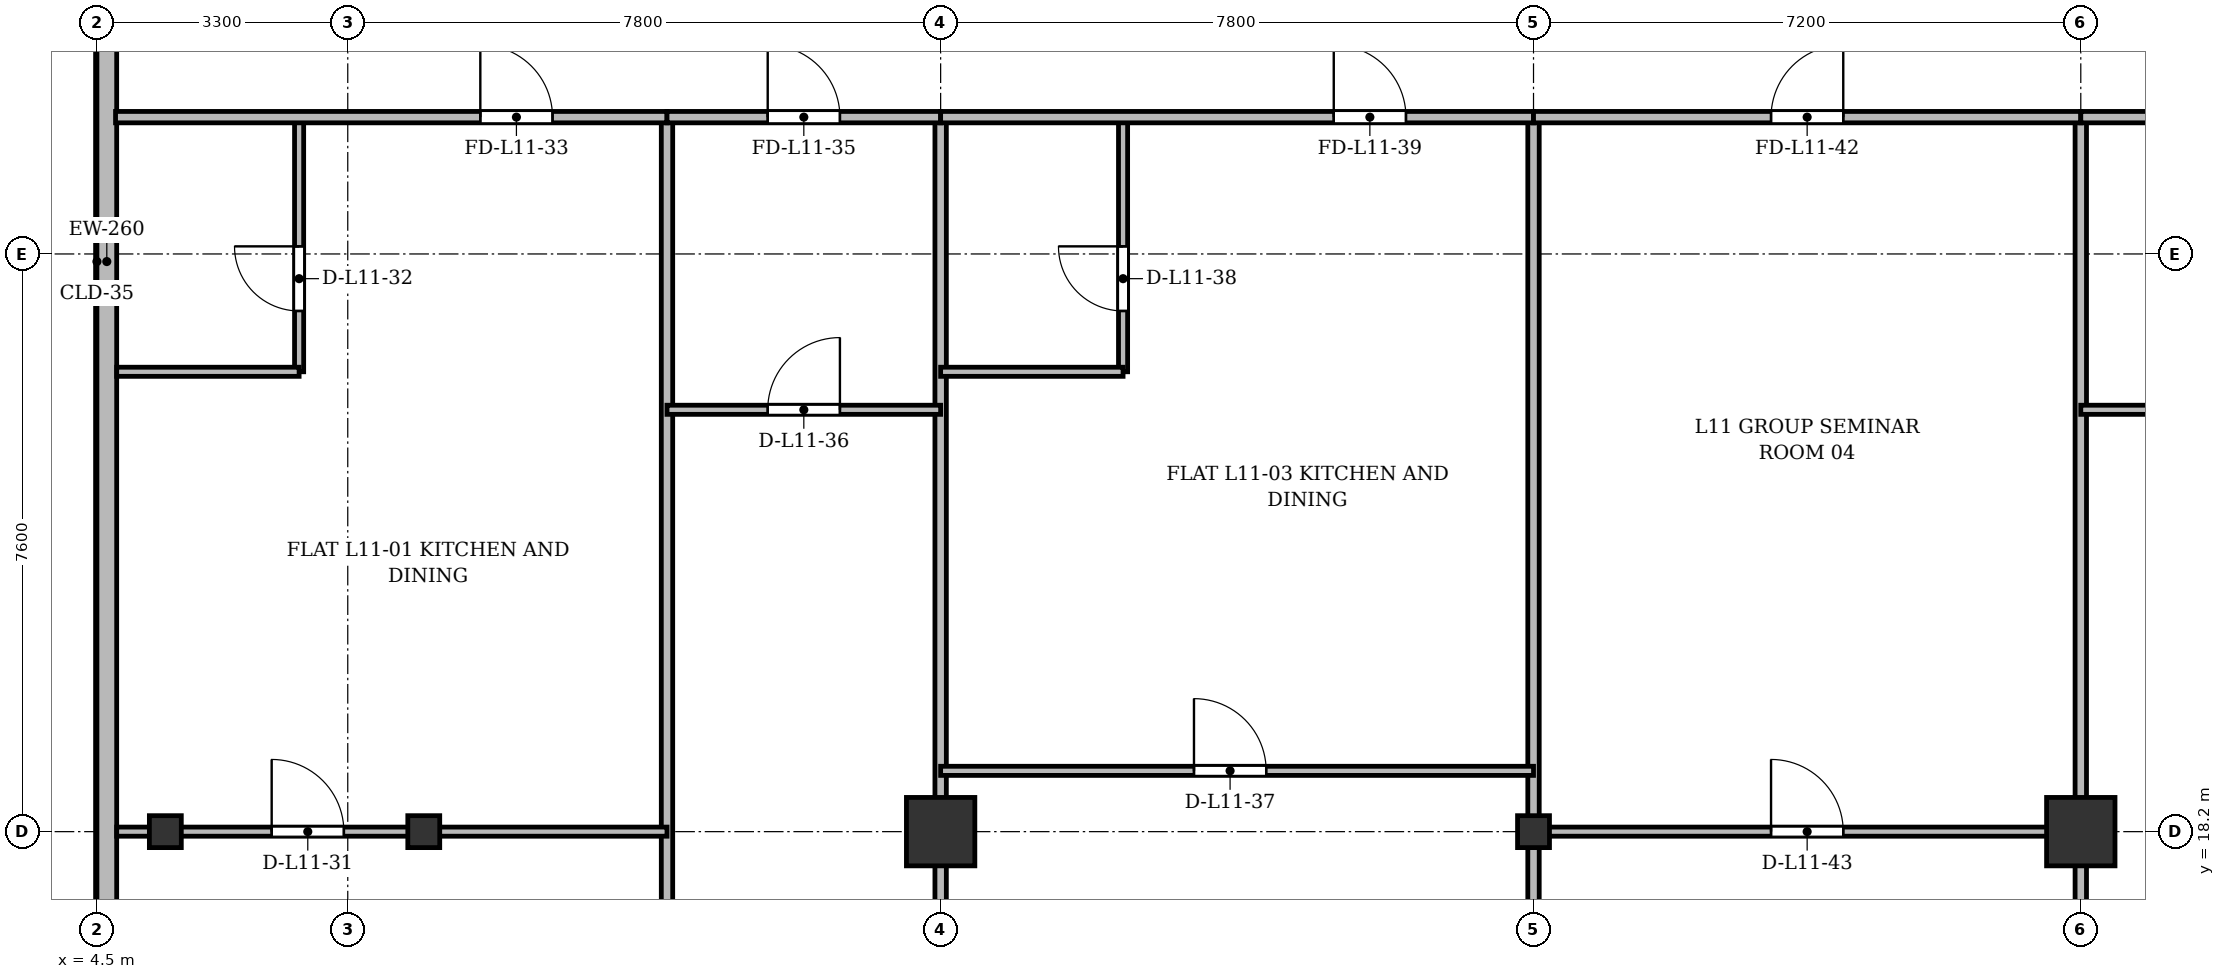
"""IFC4 building model, lengths in metres.
Left out: names, types, materials, properties, quantities, classifications, styles, units other than length and angle.
Written with IfcOpenShell. Run it as: python <this file> out.ifc"""

import sys

from ifc_helpers import new_model, si_unit, direction, frame, frame_2d, origin, origin_2d, place, context, subcontext, project, spatial, rectangle, i_section, extrude, source, transform, mapped, element, fill, save


model = new_model("IFC4")
c1 = context("Model", 3, precision=1e-05, world=origin(), true_north=direction((0.0, 1.0)))
c2 = subcontext(c1, "Body", "Model", "MODEL_VIEW")
j1 = project(units=[si_unit("LENGTHUNIT", "METRE"), si_unit("PLANEANGLEUNIT", "RADIAN")], contexts=[c1])
p1 = place(None, origin())
s1 = spatial("IfcSite", under=j1, at=p1, CompositionType="ELEMENT")
p2 = place(p1, origin())
s2 = spatial("IfcBuilding", under=s1, at=p2, CompositionType="ELEMENT")
p3 = place(p2, frame((0.0, 0.0, 45.1)))
s3 = spatial("IfcBuildingStorey", under=s2, at=p3, CompositionType="ELEMENT", Elevation=45.1)
m1 = source(origin(), c2, "Body", "SweptSolid", [
    extrude(i_section(OverallWidth=0.42, OverallDepth=0.42, WebThickness=0.026, FlangeThickness=0.04, at=origin_2d()), origin(), (0.0, 0.0, 1.0), 3.6),
])
for number, where, z_axis, x_axis in (
    (1, (5.4, 18.2, 0.0), (0.0, 0.0, 1.0), (1.0, 0.0, 0.0)),
    (2, (8.8, 18.2, 0.0), (0.0, 0.0, 1.0), (1.0, 0.0, 0.0)),
):
    element("IfcColumn", number, at=place(p3, frame(where, z_axis=z_axis, x_axis=x_axis)), inside=s3, PredefinedType="COLUMN", context=c2, shape_type="MappedRepresentation", body=[
        mapped(m1, transform((0.0, 0.0, 0.0), x_axis=(1.0, 0.0, 0.0), y_axis=(0.0, 1.0, 0.0), z_axis=(0.0, 0.0, 1.0), scale=1.0)),
    ])
m2 = source(origin(), c2, "Body", "SweptSolid", [
    extrude(rectangle(XDim=0.9, YDim=0.9, at=origin_2d()), origin(), (0.0, 0.0, 1.0), 3.6),
])
p4 = place(p3, frame((15.6, 18.2, 0.0), z_axis=(0.0, 0.0, 1.0), x_axis=(1.0, 0.0, 0.0)))
e3 = element("IfcColumn", 3, at=p4, inside=s3, PredefinedType="COLUMN", context=c2, shape_type="MappedRepresentation", body=[
    mapped(m2, transform((0.0, 0.0, 0.0), x_axis=(1.0, 0.0, 0.0), y_axis=(0.0, 1.0, 0.0), z_axis=(0.0, 0.0, 1.0), scale=1.0)),
])
p5 = place(p3, frame((23.4, 18.2, 0.0), z_axis=(0.0, 0.0, 1.0), x_axis=(1.0, 0.0, 0.0)))
e4 = element("IfcColumn", 4, at=p5, inside=s3, PredefinedType="COLUMN", context=c2, shape_type="MappedRepresentation", body=[
    mapped(m1, transform((0.0, 0.0, 0.0), x_axis=(1.0, 0.0, 0.0), y_axis=(0.0, 1.0, 0.0), z_axis=(0.0, 0.0, 1.0), scale=1.0)),
])
p6 = place(p3, frame((30.6, 18.2, 0.0), z_axis=(0.0, 0.0, 1.0), x_axis=(1.0, 0.0, 0.0)))
e5 = element("IfcColumn", 5, at=p6, inside=s3, PredefinedType="COLUMN", context=c2, shape_type="MappedRepresentation", body=[
    mapped(m2, transform((0.0, 0.0, 0.0), x_axis=(1.0, 0.0, 0.0), y_axis=(0.0, 1.0, 0.0), z_axis=(0.0, 0.0, 1.0), scale=1.0)),
])
p7 = place(p3, frame((4.63, 5.9, 0.0), z_axis=(0.0, 0.0, 1.0), x_axis=(0.0, 1.0, 0.0)))
e6 = element("IfcWall", 6, at=p7, inside=s3, PredefinedType="SOLIDWALL", context=c2, shape_type="SweptSolid", body=[
    extrude(rectangle(XDim=39.6, YDim=0.26, at=frame_2d((19.8, 0.0))), origin(), (0.0, 0.0, 1.0), 3.34),
])
p8 = place(p7, frame((1.45, 0.0, 0.92)))
e7 = element("IfcOpeningElement", 7, at=p8, cuts=e6, PredefinedType="OPENING", context=c2, shape_type="SweptSolid", body=[
    extrude(rectangle(XDim=1.2, YDim=1.65, at=frame_2d((0.6, 0.825))), frame((0.0, 0.14, 0.0), z_axis=(0.0, -1.0, 0.0), x_axis=(1.0, 0.0, 0.0)), (0.0, 0.0, 1.0), 0.28),
])
p9 = place(p7, frame((4.3, 0.0, 0.92)))
e8 = element("IfcOpeningElement", 8, at=p9, cuts=e6, PredefinedType="OPENING", context=c2, shape_type="SweptSolid", body=[
    extrude(rectangle(XDim=2.4, YDim=2.1, at=frame_2d((1.2, 1.05))), frame((0.0, 0.14, 0.0), z_axis=(0.0, -1.0, 0.0), x_axis=(1.0, 0.0, 0.0)), (0.0, 0.0, 1.0), 0.28),
])
p10 = place(p7, frame((8.5, 0.0, 0.92)))
e9 = element("IfcOpeningElement", 9, at=p10, cuts=e6, PredefinedType="OPENING", context=c2, shape_type="SweptSolid", body=[
    extrude(rectangle(XDim=2.4, YDim=2.1, at=frame_2d((1.2, 1.05))), frame((0.0, 0.14, 0.0), z_axis=(0.0, -1.0, 0.0), x_axis=(1.0, 0.0, 0.0)), (0.0, 0.0, 1.0), 0.28),
])
p11 = place(p7, frame((29.7, 0.0, 0.92)))
e10 = element("IfcOpeningElement", 10, at=p11, cuts=e6, PredefinedType="OPENING", context=c2, shape_type="SweptSolid", body=[
    extrude(rectangle(XDim=2.4, YDim=2.1, at=frame_2d((1.2, 1.05))), frame((0.0, 0.14, 0.0), z_axis=(0.0, -1.0, 0.0), x_axis=(1.0, 0.0, 0.0)), (0.0, 0.0, 1.0), 0.28),
])
p12 = place(p7, frame((33.9, 0.0, 0.92)))
e11 = element("IfcOpeningElement", 11, at=p12, cuts=e6, PredefinedType="OPENING", context=c2, shape_type="SweptSolid", body=[
    extrude(rectangle(XDim=1.2, YDim=1.65, at=frame_2d((0.6, 0.825))), frame((0.0, 0.14, 0.0), z_axis=(0.0, -1.0, 0.0), x_axis=(1.0, 0.0, 0.0)), (0.0, 0.0, 1.0), 0.28),
])
p13 = place(p7, frame((37.25, 0.0, 0.92)))
e12 = element("IfcOpeningElement", 12, at=p13, cuts=e6, PredefinedType="OPENING", context=c2, shape_type="SweptSolid", body=[
    extrude(rectangle(XDim=1.2, YDim=1.65, at=frame_2d((0.6, 0.825))), frame((0.0, 0.14, 0.0), z_axis=(0.0, -1.0, 0.0), x_axis=(1.0, 0.0, 0.0)), (0.0, 0.0, 1.0), 0.28),
])
p14 = place(p3, frame((12.0, 3.145, 0.0), z_axis=(0.0, 0.0, 1.0), x_axis=(0.0, 1.0, 0.0)))
e13 = element("IfcWall", 13, at=p14, inside=s3, PredefinedType="PARTITIONING", context=c2, shape_type="SweptSolid", body=[
    extrude(rectangle(XDim=24.455, YDim=0.15, at=frame_2d((12.228, 0.0))), origin(), (0.0, 0.0, 1.0), 2.69),
])
for number, where, z_axis, x_axis in (
    (14, (15.6, 3.145, 0.0), (0.0, 0.0, 1.0), (0.0, 1.0, 0.0)),
    (15, (23.4, 3.145, 0.0), (0.0, 0.0, 1.0), (0.0, 1.0, 0.0)),
    (16, (30.6, 3.145, 0.0), (0.0, 0.0, 1.0), (0.0, 1.0, 0.0)),
):
    element("IfcWall", number, at=place(p3, frame(where, z_axis=z_axis, x_axis=x_axis)), inside=s3, PredefinedType="PARTITIONING", context=c2, shape_type="SweptSolid", body=[
        extrude(rectangle(XDim=24.455, YDim=0.15, at=frame_2d((12.228, 0.0))), origin(), (0.0, 0.0, 1.0), 2.752),
    ])
p15 = place(p3, frame((4.76, 18.2, 0.0), z_axis=(0.0, 0.0, 1.0), x_axis=(1.0, 0.0, 0.0)))
e17 = element("IfcWall", 17, at=p15, inside=s3, PredefinedType="PARTITIONING", context=c2, shape_type="SweptSolid", body=[
    extrude(rectangle(XDim=7.24, YDim=0.12, at=frame_2d((3.62, 0.0))), origin(), (0.0, 0.0, 1.0), 2.69),
])
p16 = place(p15, frame((2.039, 0.0, 0.0)))
e18 = element("IfcOpeningElement", 18, at=p16, cuts=e17, PredefinedType="OPENING", context=c2, shape_type="SweptSolid", body=[
    extrude(rectangle(XDim=0.95, YDim=2.15, at=frame_2d((0.475, 1.075))), frame((0.0, 0.07, 0.0), z_axis=(0.0, -1.0, 0.0), x_axis=(1.0, 0.0, 0.0)), (0.0, 0.0, 1.0), 0.14),
])
p17 = place(p3, frame((7.16, 24.25, 0.0), z_axis=(0.0, 0.0, 1.0), x_axis=(0.0, 1.0, 0.0)))
e19 = element("IfcWall", 19, at=p17, inside=s3, PredefinedType="PARTITIONING", context=c2, shape_type="SweptSolid", body=[
    extrude(rectangle(XDim=3.35, YDim=0.12, at=frame_2d((1.675, 0.0))), origin(), (0.0, 0.0, 1.0), 2.94),
])
p18 = place(p17, frame((0.8, 0.0, 0.0)))
e20 = element("IfcOpeningElement", 20, at=p18, cuts=e19, PredefinedType="OPENING", context=c2, shape_type="SweptSolid", body=[
    extrude(rectangle(XDim=0.85, YDim=2.1, at=frame_2d((0.425, 1.05))), frame((0.0, 0.07, 0.0), z_axis=(0.0, -1.0, 0.0), x_axis=(1.0, 0.0, 0.0)), (0.0, 0.0, 1.0), 0.14),
])
p19 = place(p3, frame((4.76, 24.25, 0.0), z_axis=(0.0, 0.0, 1.0), x_axis=(1.0, 0.0, 0.0)))
e21 = element("IfcWall", 21, at=p19, inside=s3, PredefinedType="PARTITIONING", context=c2, shape_type="SweptSolid", body=[
    extrude(rectangle(XDim=2.4, YDim=0.12, at=frame_2d((1.2, 0.0))), origin(), (0.0, 0.0, 1.0), 2.752),
])
p20 = place(p3, frame((4.745, 27.6, 0.0), z_axis=(0.0, 0.0, 1.0), x_axis=(1.0, 0.0, 0.0)))
e22 = element("IfcWall", 22, at=p20, inside=s3, PredefinedType="PARTITIONING", context=c2, shape_type="SweptSolid", body=[
    extrude(rectangle(XDim=7.255, YDim=0.15, at=frame_2d((3.627, 0.0))), origin(), (0.0, 0.0, 1.0), 2.752),
])
p21 = place(p20, frame((4.799, 0.0, 0.0)))
e23 = element("IfcOpeningElement", 23, at=p21, cuts=e22, PredefinedType="OPENING", context=c2, shape_type="SweptSolid", body=[
    extrude(rectangle(XDim=0.95, YDim=2.15, at=frame_2d((0.475, 1.075))), frame((0.0, 0.085, 0.0), z_axis=(0.0, -1.0, 0.0), x_axis=(1.0, 0.0, 0.0)), (0.0, 0.0, 1.0), 0.17),
])
p22 = place(p3, frame((12.0, 27.6, 0.0), z_axis=(0.0, 0.0, 1.0), x_axis=(1.0, 0.0, 0.0)))
e24 = element("IfcWall", 24, at=p22, inside=s3, PredefinedType="PARTITIONING", context=c2, shape_type="SweptSolid", body=[
    extrude(rectangle(XDim=3.6, YDim=0.15, at=frame_2d((1.8, 0.0))), origin(), (0.0, 0.0, 1.0), 2.752),
])
p23 = place(p22, frame((1.325, 0.0, 0.0)))
e25 = element("IfcOpeningElement", 25, at=p23, cuts=e24, PredefinedType="OPENING", context=c2, shape_type="SweptSolid", body=[
    extrude(rectangle(XDim=0.95, YDim=2.15, at=frame_2d((0.475, 1.075))), frame((0.0, 0.085, 0.0), z_axis=(0.0, -1.0, 0.0), x_axis=(1.0, 0.0, 0.0)), (0.0, 0.0, 1.0), 0.17),
])
p24 = place(p3, frame((12.0, 23.75, 0.0), z_axis=(0.0, 0.0, 1.0), x_axis=(1.0, 0.0, 0.0)))
e26 = element("IfcWall", 26, at=p24, inside=s3, PredefinedType="PARTITIONING", context=c2, shape_type="SweptSolid", body=[
    extrude(rectangle(XDim=3.6, YDim=0.12, at=frame_2d((1.8, 0.0))), origin(), (0.0, 0.0, 1.0), 2.752),
])
p25 = place(p24, frame((1.325, 0.0, 0.0)))
e27 = element("IfcOpeningElement", 27, at=p25, cuts=e26, PredefinedType="OPENING", context=c2, shape_type="SweptSolid", body=[
    extrude(rectangle(XDim=0.95, YDim=2.15, at=frame_2d((0.475, 1.075))), frame((0.0, 0.07, 0.0), z_axis=(0.0, -1.0, 0.0), x_axis=(1.0, 0.0, 0.0)), (0.0, 0.0, 1.0), 0.14),
])
p26 = place(p3, frame((15.6, 19.0, 0.0), z_axis=(0.0, 0.0, 1.0), x_axis=(1.0, 0.0, 0.0)))
e28 = element("IfcWall", 28, at=p26, inside=s3, PredefinedType="PARTITIONING", context=c2, shape_type="SweptSolid", body=[
    extrude(rectangle(XDim=7.8, YDim=0.12, at=frame_2d((3.9, 0.0))), origin(), (0.0, 0.0, 1.0), 2.752),
])
p27 = place(p26, frame((3.333, 0.0, 0.0)))
e29 = element("IfcOpeningElement", 29, at=p27, cuts=e28, PredefinedType="OPENING", context=c2, shape_type="SweptSolid", body=[
    extrude(rectangle(XDim=0.95, YDim=2.15, at=frame_2d((0.475, 1.075))), frame((0.0, 0.07, 0.0), z_axis=(0.0, -1.0, 0.0), x_axis=(1.0, 0.0, 0.0)), (0.0, 0.0, 1.0), 0.14),
])
p28 = place(p3, frame((18.0, 24.25, 0.0), z_axis=(0.0, 0.0, 1.0), x_axis=(0.0, 1.0, 0.0)))
e30 = element("IfcWall", 30, at=p28, inside=s3, PredefinedType="PARTITIONING", context=c2, shape_type="SweptSolid", body=[
    extrude(rectangle(XDim=3.35, YDim=0.12, at=frame_2d((1.675, 0.0))), origin(), (0.0, 0.0, 1.0), 2.94),
])
p29 = place(p28, frame((0.8, 0.0, 0.0)))
e31 = element("IfcOpeningElement", 31, at=p29, cuts=e30, PredefinedType="OPENING", context=c2, shape_type="SweptSolid", body=[
    extrude(rectangle(XDim=0.85, YDim=2.1, at=frame_2d((0.425, 1.05))), frame((0.0, 0.07, 0.0), z_axis=(0.0, -1.0, 0.0), x_axis=(1.0, 0.0, 0.0)), (0.0, 0.0, 1.0), 0.14),
])
p30 = place(p3, frame((15.6, 24.25, 0.0), z_axis=(0.0, 0.0, 1.0), x_axis=(1.0, 0.0, 0.0)))
e32 = element("IfcWall", 32, at=p30, inside=s3, PredefinedType="PARTITIONING", context=c2, shape_type="SweptSolid", body=[
    extrude(rectangle(XDim=2.4, YDim=0.12, at=frame_2d((1.2, 0.0))), origin(), (0.0, 0.0, 1.0), 2.752),
])
p31 = place(p3, frame((15.6, 27.6, 0.0), z_axis=(0.0, 0.0, 1.0), x_axis=(1.0, 0.0, 0.0)))
e33 = element("IfcWall", 33, at=p31, inside=s3, PredefinedType="PARTITIONING", context=c2, shape_type="SweptSolid", body=[
    extrude(rectangle(XDim=7.8, YDim=0.15, at=frame_2d((3.9, 0.0))), origin(), (0.0, 0.0, 1.0), 2.752),
])
p32 = place(p31, frame((5.172, 0.0, 0.0)))
e34 = element("IfcOpeningElement", 34, at=p32, cuts=e33, PredefinedType="OPENING", context=c2, shape_type="SweptSolid", body=[
    extrude(rectangle(XDim=0.95, YDim=2.15, at=frame_2d((0.475, 1.075))), frame((0.0, 0.085, 0.0), z_axis=(0.0, -1.0, 0.0), x_axis=(1.0, 0.0, 0.0)), (0.0, 0.0, 1.0), 0.17),
])
p33 = place(p3, frame((23.4, 27.6, 0.0), z_axis=(0.0, 0.0, 1.0), x_axis=(1.0, 0.0, 0.0)))
e35 = element("IfcWall", 35, at=p33, inside=s3, PredefinedType="PARTITIONING", context=c2, shape_type="SweptSolid", body=[
    extrude(rectangle(XDim=7.2, YDim=0.15, at=frame_2d((3.6, 0.0))), origin(), (0.0, 0.0, 1.0), 2.752),
])
p34 = place(p33, frame((3.125, 0.0, 0.0)))
e36 = element("IfcOpeningElement", 36, at=p34, cuts=e35, PredefinedType="OPENING", context=c2, shape_type="SweptSolid", body=[
    extrude(rectangle(XDim=0.95, YDim=2.15, at=frame_2d((0.475, 1.075))), frame((0.0, 0.085, 0.0), z_axis=(0.0, -1.0, 0.0), x_axis=(1.0, 0.0, 0.0)), (0.0, 0.0, 1.0), 0.17),
])
p35 = place(p3, frame((23.4, 18.2, 0.0), z_axis=(0.0, 0.0, 1.0), x_axis=(1.0, 0.0, 0.0)))
e37 = element("IfcWall", 37, at=p35, inside=s3, PredefinedType="PARTITIONING", context=c2, shape_type="SweptSolid", body=[
    extrude(rectangle(XDim=7.2, YDim=0.12, at=frame_2d((3.6, 0.0))), origin(), (0.0, 0.0, 1.0), 2.69),
])
p36 = place(p35, frame((3.125, 0.0, 0.0)))
e38 = element("IfcOpeningElement", 38, at=p36, cuts=e37, PredefinedType="OPENING", context=c2, shape_type="SweptSolid", body=[
    extrude(rectangle(XDim=0.95, YDim=2.15, at=frame_2d((0.475, 1.075))), frame((0.0, 0.07, 0.0), z_axis=(0.0, -1.0, 0.0), x_axis=(1.0, 0.0, 0.0)), (0.0, 0.0, 1.0), 0.14),
])
p37 = place(p3, frame((30.6, 27.6, 0.0), z_axis=(0.0, 0.0, 1.0), x_axis=(1.0, 0.0, 0.0)))
e39 = element("IfcWall", 39, at=p37, inside=s3, PredefinedType="PARTITIONING", context=c2, shape_type="SweptSolid", body=[
    extrude(rectangle(XDim=8.4, YDim=0.15, at=frame_2d((4.2, 0.0))), origin(), (0.0, 0.0, 1.0), 2.752),
])
p38 = place(p37, frame((3.635, 0.0, 0.0)))
e40 = element("IfcOpeningElement", 40, at=p38, cuts=e39, PredefinedType="OPENING", context=c2, shape_type="SweptSolid", body=[
    extrude(rectangle(XDim=0.95, YDim=2.15, at=frame_2d((0.475, 1.075))), frame((0.0, 0.085, 0.0), z_axis=(0.0, -1.0, 0.0), x_axis=(1.0, 0.0, 0.0)), (0.0, 0.0, 1.0), 0.17),
])
p39 = place(p3, frame((30.6, 23.75, 0.0), z_axis=(0.0, 0.0, 1.0), x_axis=(1.0, 0.0, 0.0)))
e41 = element("IfcWall", 41, at=p39, inside=s3, PredefinedType="PARTITIONING", context=c2, shape_type="SweptSolid", body=[
    extrude(rectangle(XDim=8.4, YDim=0.12, at=frame_2d((4.2, 0.0))), origin(), (0.0, 0.0, 1.0), 2.752),
])
p40 = place(p39, frame((3.635, 0.0, 0.0)))
e42 = element("IfcOpeningElement", 42, at=p40, cuts=e41, PredefinedType="OPENING", context=c2, shape_type="SweptSolid", body=[
    extrude(rectangle(XDim=0.95, YDim=2.15, at=frame_2d((0.475, 1.075))), frame((0.0, 0.07, 0.0), z_axis=(0.0, -1.0, 0.0), x_axis=(1.0, 0.0, 0.0)), (0.0, 0.0, 1.0), 0.14),
])
m3 = source(origin(), c2, "Body", "SweptSolid", [
    extrude(rectangle(XDim=0.95, YDim=2.15, at=frame_2d((0.475, 1.075))), frame((0.0, 0.025, 0.0), z_axis=(0.0, -1.0, 0.0), x_axis=(1.0, 0.0, 0.0)), (0.0, 0.0, 1.0), 0.05),
])
p41 = place(p16, origin())
e43 = element("IfcDoor", 43, at=p41, inside=s3, OperationType="SINGLE_SWING_LEFT", PredefinedType="DOOR", context=c2, shape_type="MappedRepresentation", body=[
    mapped(m3, transform((0.0, 0.0, 0.0), x_axis=(1.0, 0.0, 0.0), y_axis=(0.0, 1.0, 0.0), z_axis=(0.0, 0.0, 1.0), scale=1.0)),
])
fill(e18, e43)
m4 = source(origin(), c2, "Body", "SweptSolid", [
    extrude(rectangle(XDim=0.85, YDim=2.1, at=frame_2d((0.425, 1.05))), frame((0.0, 0.025, 0.0), z_axis=(0.0, -1.0, 0.0), x_axis=(1.0, 0.0, 0.0)), (0.0, 0.0, 1.0), 0.05),
])
p42 = place(p18, origin())
e44 = element("IfcDoor", 44, at=p42, inside=s3, OperationType="SINGLE_SWING_RIGHT", PredefinedType="DOOR", context=c2, shape_type="MappedRepresentation", body=[
    mapped(m4, transform((0.0, 0.0, 0.0), x_axis=(1.0, 0.0, 0.0), y_axis=(0.0, 1.0, 0.0), z_axis=(0.0, 0.0, 1.0), scale=1.0)),
])
fill(e20, e44)
p43 = place(p21, origin())
e45 = element("IfcDoor", 45, at=p43, inside=s3, OperationType="SINGLE_SWING_LEFT", PredefinedType="DOOR", context=c2, shape_type="MappedRepresentation", body=[
    mapped(m3, transform((0.0, 0.0, 0.0), x_axis=(1.0, 0.0, 0.0), y_axis=(0.0, 1.0, 0.0), z_axis=(0.0, 0.0, 1.0), scale=1.0)),
])
fill(e23, e45)
p44 = place(p23, origin())
e46 = element("IfcDoor", 46, at=p44, inside=s3, OperationType="SINGLE_SWING_LEFT", PredefinedType="DOOR", context=c2, shape_type="MappedRepresentation", body=[
    mapped(m3, transform((0.0, 0.0, 0.0), x_axis=(1.0, 0.0, 0.0), y_axis=(0.0, 1.0, 0.0), z_axis=(0.0, 0.0, 1.0), scale=1.0)),
])
fill(e25, e46)
p45 = place(p25, origin())
e47 = element("IfcDoor", 47, at=p45, inside=s3, OperationType="SINGLE_SWING_RIGHT", PredefinedType="DOOR", context=c2, shape_type="MappedRepresentation", body=[
    mapped(m3, transform((0.0, 0.0, 0.0), x_axis=(1.0, 0.0, 0.0), y_axis=(0.0, 1.0, 0.0), z_axis=(0.0, 0.0, 1.0), scale=1.0)),
])
fill(e27, e47)
p46 = place(p27, origin())
e48 = element("IfcDoor", 48, at=p46, inside=s3, OperationType="SINGLE_SWING_LEFT", PredefinedType="DOOR", context=c2, shape_type="MappedRepresentation", body=[
    mapped(m3, transform((0.0, 0.0, 0.0), x_axis=(1.0, 0.0, 0.0), y_axis=(0.0, 1.0, 0.0), z_axis=(0.0, 0.0, 1.0), scale=1.0)),
])
fill(e29, e48)
p47 = place(p29, origin())
e49 = element("IfcDoor", 49, at=p47, inside=s3, OperationType="SINGLE_SWING_RIGHT", PredefinedType="DOOR", context=c2, shape_type="MappedRepresentation", body=[
    mapped(m4, transform((0.0, 0.0, 0.0), x_axis=(1.0, 0.0, 0.0), y_axis=(0.0, 1.0, 0.0), z_axis=(0.0, 0.0, 1.0), scale=1.0)),
])
fill(e31, e49)
p48 = place(p32, origin())
e50 = element("IfcDoor", 50, at=p48, inside=s3, OperationType="SINGLE_SWING_LEFT", PredefinedType="DOOR", context=c2, shape_type="MappedRepresentation", body=[
    mapped(m3, transform((0.0, 0.0, 0.0), x_axis=(1.0, 0.0, 0.0), y_axis=(0.0, 1.0, 0.0), z_axis=(0.0, 0.0, 1.0), scale=1.0)),
])
fill(e34, e50)
p49 = place(p34, origin())
e51 = element("IfcDoor", 51, at=p49, inside=s3, OperationType="SINGLE_SWING_RIGHT", PredefinedType="DOOR", context=c2, shape_type="MappedRepresentation", body=[
    mapped(m3, transform((0.0, 0.0, 0.0), x_axis=(1.0, 0.0, 0.0), y_axis=(0.0, 1.0, 0.0), z_axis=(0.0, 0.0, 1.0), scale=1.0)),
])
fill(e36, e51)
p50 = place(p36, origin())
e52 = element("IfcDoor", 52, at=p50, inside=s3, OperationType="SINGLE_SWING_LEFT", PredefinedType="DOOR", context=c2, shape_type="MappedRepresentation", body=[
    mapped(m3, transform((0.0, 0.0, 0.0), x_axis=(1.0, 0.0, 0.0), y_axis=(0.0, 1.0, 0.0), z_axis=(0.0, 0.0, 1.0), scale=1.0)),
])
fill(e38, e52)
save(model, sys.argv[1])
